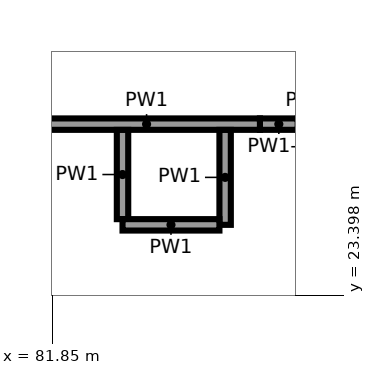
"""IFC4 building model, lengths in metres.
Left out: names, types, materials, properties, quantities, classifications, styles, units other than length and angle.
Written with IfcOpenShell. Run it as: python <this file> out.ifc"""

import sys

from ifc_helpers import new_model, si_unit, direction, frame, frame_2d, origin, place, context, subcontext, project, spatial, rectangle, extrude, element, save


model = new_model("IFC4")
c1 = context("Model", 3, precision=1e-05, world=origin(), true_north=direction((0.0, 1.0)))
c2 = subcontext(c1, "Body", "Model", "MODEL_VIEW")
j1 = project(units=[si_unit("LENGTHUNIT", "METRE"), si_unit("PLANEANGLEUNIT", "RADIAN")], contexts=[c1])
p1 = place(None, origin())
s1 = spatial("IfcSite", under=j1, at=p1, CompositionType="ELEMENT")
p2 = place(p1, origin())
s2 = spatial("IfcBuilding", under=s1, at=p2, CompositionType="ELEMENT")
p3 = place(p2, frame((0.0, 0.0, -4.0)))
s3 = spatial("IfcBuildingStorey", under=s2, at=p3, CompositionType="ELEMENT", Elevation=-4.0)
p4 = place(p3, frame((85.08, 25.65, 0.0), z_axis=(0.0, 0.0, 1.0), x_axis=(-1.0, 0.0, 0.0)))
e1 = element("IfcWall", 1, at=p4, inside=s3, PredefinedType="PARTITIONING", context=c2, shape_type="SweptSolid", body=[
    extrude(rectangle(XDim=0.497, YDim=0.15, at=frame_2d((0.249, 0.0))), origin(), (0.0, 0.0, 1.0), 2.5),
])
p5 = place(p3, frame((84.583, 25.65, 0.0), z_axis=(0.0, 0.0, 1.0), x_axis=(-1.0, 0.0, 0.0)))
e2 = element("IfcWall", 2, at=p5, inside=s3, PredefinedType="PARTITIONING", context=c2, shape_type="SweptSolid", body=[
    extrude(rectangle(XDim=2.983, YDim=0.15, at=frame_2d((1.491, 0.0))), origin(), (0.0, 0.0, 1.0), 3.6),
])
p6 = place(p3, frame((84.125, 24.325, 0.0), z_axis=(0.0, 0.0, 1.0), x_axis=(0.0, 1.0, 0.0)))
e3 = element("IfcWall", 3, at=p6, inside=s3, PredefinedType="PARTITIONING", context=c2, shape_type="SweptSolid", body=[
    extrude(rectangle(XDim=1.249, YDim=0.15, at=frame_2d((0.625, 0.0))), origin(), (0.0, 0.0, 1.0), 3.6),
])
p7 = place(p3, frame((82.775, 25.574, 0.0), z_axis=(0.0, 0.0, 1.0), x_axis=(0.0, -1.0, 0.0)))
e4 = element("IfcWall", 4, at=p7, inside=s3, PredefinedType="PARTITIONING", context=c2, shape_type="SweptSolid", body=[
    extrude(rectangle(XDim=1.174, YDim=0.15, at=frame_2d((0.587, 0.0))), origin(), (0.0, 0.0, 1.0), 3.6),
])
p8 = place(p3, frame((82.775, 24.325, 0.0), z_axis=(0.0, 0.0, 1.0), x_axis=(1.0, 0.0, 0.0)))
e5 = element("IfcWall", 5, at=p8, inside=s3, PredefinedType="PARTITIONING", context=c2, shape_type="SweptSolid", body=[
    extrude(rectangle(XDim=1.275, YDim=0.15, at=frame_2d((0.638, 0.0))), origin(), (0.0, 0.0, 1.0), 3.6),
])
save(model, sys.argv[1])
